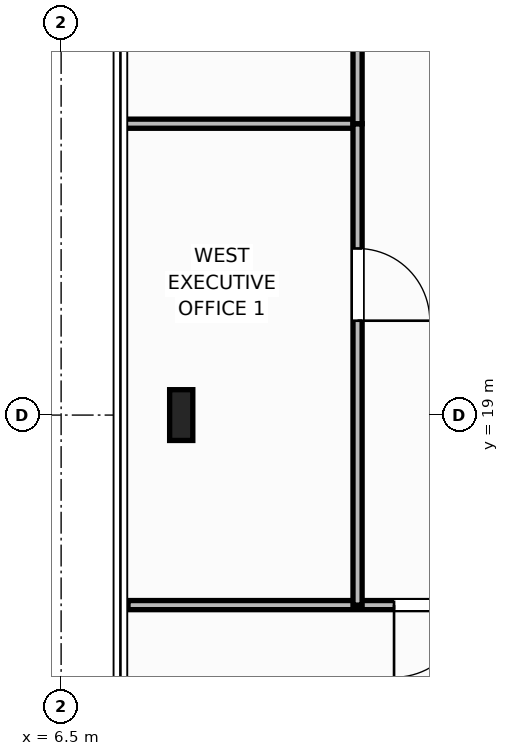
"""IFC4 building model, lengths in metres.
Left out: names, types, materials, properties, quantities, classifications, styles, units other than length and angle.
Written with IfcOpenShell. Run it as: python <this file> out.ifc"""

import sys

from ifc_helpers import new_model, si_unit, direction, frame, frame_2d, origin, origin_2d, place, context, subcontext, project, spatial, rectangle, i_section, extrude, element, fill, save


model = new_model("IFC4")
c1 = context("Model", 3, precision=1e-05, world=origin(), true_north=direction((0.0, 1.0)))
c2 = subcontext(c1, "Body", "Model", "MODEL_VIEW")
j1 = project(units=[si_unit("LENGTHUNIT", "METRE"), si_unit("PLANEANGLEUNIT", "RADIAN")], contexts=[c1])
p1 = place(None, origin())
s1 = spatial("IfcSite", under=j1, at=p1, CompositionType="ELEMENT")
p2 = place(p1, origin())
s2 = spatial("IfcBuilding", under=s1, at=p2, CompositionType="ELEMENT")
p3 = place(p2, frame((0.0, 0.0, 290.4)))
s3 = spatial("IfcBuildingStorey", under=s2, at=p3, CompositionType="ELEMENT", Elevation=290.4)
p4 = place(p3, frame((8.08, 19.0, 0.0), z_axis=(0.0, 0.0, 1.0), x_axis=(1.0, 0.0, 0.0)))
e1 = element("IfcColumn", 1, at=p4, inside=s3, PredefinedType="COLUMN", context=c2, shape_type="SweptSolid", body=[
    extrude(i_section(OverallWidth=0.305, OverallDepth=0.668, WebThickness=0.021, FlangeThickness=0.04, at=origin_2d()), origin(), (0.0, 0.0, 1.0), 4.0),
])
p5 = place(p3, frame((7.38, 16.5, 0.0), z_axis=(0.0, 0.0, 1.0), x_axis=(1.0, 0.0, 0.0)))
e2 = element("IfcWall", 2, at=p5, inside=s3, PredefinedType="PARTITIONING", context=c2, shape_type="SweptSolid", body=[
    extrude(rectangle(XDim=6.734, YDim=0.12, at=frame_2d((3.367, 0.0))), origin(), (0.0, 0.0, 1.0), 3.788),
])
p6 = place(p5, frame((3.5, 0.0, 0.0)))
e3 = element("IfcOpeningElement", 3, at=p6, cuts=e2, PredefinedType="OPENING", context=c2, shape_type="SweptSolid", body=[
    extrude(rectangle(XDim=0.95, YDim=2.15, at=frame_2d((0.475, 1.075))), frame((0.0, 0.07, 0.0), z_axis=(0.0, -1.0, 0.0), x_axis=(1.0, 0.0, 0.0)), (0.0, 0.0, 1.0), 0.14),
])
p7 = place(p3, frame((7.22, 22.833, 0.0), z_axis=(0.0, 0.0, 1.0), x_axis=(1.0, 0.0, 0.0)))
e4 = element("IfcWall", 4, at=p7, inside=s3, PredefinedType="PARTITIONING", context=c2, shape_type="SweptSolid", body=[
    extrude(rectangle(XDim=3.18, YDim=0.12, at=frame_2d((1.59, 0.0))), origin(), (0.0, 0.0, 1.0), 3.788),
])
p8 = place(p3, frame((10.4, 16.5, 0.0), z_axis=(0.0, 0.0, 1.0), x_axis=(0.0, 1.0, 0.0)))
e5 = element("IfcWall", 5, at=p8, inside=s3, PredefinedType="PARTITIONING", context=c2, shape_type="SweptSolid", body=[
    extrude(rectangle(XDim=6.333, YDim=0.12, at=frame_2d((3.167, 0.0))), origin(), (0.0, 0.0, 1.0), 3.788),
])
p9 = place(p8, frame((3.742, 0.0, 0.0)))
e6 = element("IfcOpeningElement", 6, at=p9, cuts=e5, PredefinedType="OPENING", context=c2, shape_type="SweptSolid", body=[
    extrude(rectangle(XDim=0.95, YDim=2.15, at=frame_2d((0.475, 1.075))), frame((0.0, 0.07, 0.0), z_axis=(0.0, -1.0, 0.0), x_axis=(1.0, 0.0, 0.0)), (0.0, 0.0, 1.0), 0.14),
])
p10 = place(p3, frame((10.4, 22.833, 0.0), z_axis=(0.0, 0.0, 1.0), x_axis=(0.0, 1.0, 0.0)))
e7 = element("IfcWall", 7, at=p10, inside=s3, PredefinedType="PARTITIONING", context=c2, shape_type="SweptSolid", body=[
    extrude(rectangle(XDim=6.333, YDim=0.12, at=frame_2d((3.167, 0.0))), origin(), (0.0, 0.0, 1.0), 3.788),
])
p11 = place(p10, frame((2.692, 0.0, 0.0)))
e8 = element("IfcOpeningElement", 8, at=p11, cuts=e7, PredefinedType="OPENING", context=c2, shape_type="SweptSolid", body=[
    extrude(rectangle(XDim=0.95, YDim=2.15, at=frame_2d((0.475, 1.075))), frame((0.0, 0.07, 0.0), z_axis=(0.0, -1.0, 0.0), x_axis=(1.0, 0.0, 0.0)), (0.0, 0.0, 1.0), 0.14),
])
p12 = place(p6, origin())
e9 = element("IfcDoor", 9, at=p12, inside=s3, OperationType="SINGLE_SWING_RIGHT", PredefinedType="DOOR", context=c2, shape_type="SweptSolid", body=[
    extrude(rectangle(XDim=0.95, YDim=2.15, at=frame_2d((0.475, 1.075))), frame((0.0, 0.025, 0.0), z_axis=(0.0, -1.0, 0.0), x_axis=(1.0, 0.0, 0.0)), (0.0, 0.0, 1.0), 0.05),
])
fill(e3, e9)
p13 = place(p9, origin())
e10 = element("IfcDoor", 10, at=p13, inside=s3, OperationType="SINGLE_SWING_RIGHT", PredefinedType="DOOR", context=c2, shape_type="SweptSolid", body=[
    extrude(rectangle(XDim=0.95, YDim=2.15, at=frame_2d((0.475, 1.075))), frame((0.0, 0.025, 0.0), z_axis=(0.0, -1.0, 0.0), x_axis=(1.0, 0.0, 0.0)), (0.0, 0.0, 1.0), 0.05),
])
fill(e6, e10)
save(model, sys.argv[1])
